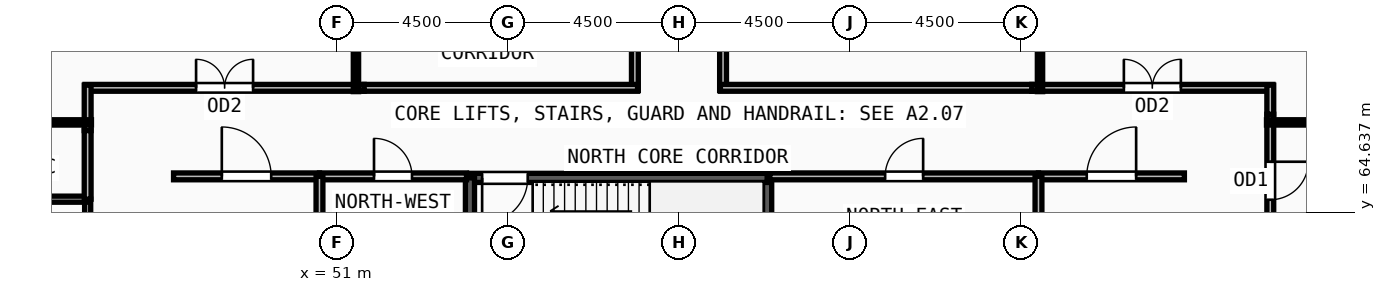
"""IFC4 building model, lengths in metres.
Left out: names, types, materials, properties, quantities, classifications, styles, units other than length and angle.
Written with IfcOpenShell. Run it as: python <this file> out.ifc"""

import sys

from ifc_helpers import new_model, si_unit, direction, frame, frame_2d, origin, place, context, subcontext, project, spatial, rectangle, extrude, source, transform, mapped, element, fill, save


model = new_model("IFC4")
c1 = context("Model", 3, precision=1e-05, world=origin(), true_north=direction((0.0, 1.0)))
c2 = subcontext(c1, "Body", "Model", "MODEL_VIEW")
j1 = project(units=[si_unit("LENGTHUNIT", "METRE"), si_unit("PLANEANGLEUNIT", "RADIAN")], contexts=[c1])
p1 = place(None, origin())
s1 = spatial("IfcSite", under=j1, at=p1, CompositionType="ELEMENT")
p2 = place(p1, origin())
s2 = spatial("IfcBuilding", under=s1, at=p2, CompositionType="ELEMENT")
p3 = place(p2, frame((0.0, 0.0, 74.25)))
s3 = spatial("IfcBuildingStorey", under=s2, at=p3, CompositionType="ELEMENT", Elevation=74.25)
p4 = place(p3, frame((62.32, 62.1, 0.0), z_axis=(0.0, 0.0, 1.0), x_axis=(0.0, 1.0, 0.0)))
e1 = element("IfcWall", 1, at=p4, inside=s3, PredefinedType="SOLIDWALL", context=c2, shape_type="SweptSolid", body=[
    extrude(rectangle(XDim=3.44, YDim=0.24, at=frame_2d((1.72, 0.0))), origin(), (0.0, 0.0, 1.0), 3.57),
])
p5 = place(p3, frame((62.32, 65.54, 0.0), z_axis=(0.0, 0.0, 1.0), x_axis=(-1.0, 0.0, 0.0)))
e2 = element("IfcWall", 2, at=p5, inside=s3, PredefinedType="SOLIDWALL", context=c2, shape_type="SweptSolid", body=[
    extrude(rectangle(XDim=7.82, YDim=0.24, at=frame_2d((3.91, 0.0))), origin(), (0.0, 0.0, 1.0), 3.57),
])
m1 = source(origin(), c2, "Body", "SweptSolid", [
    extrude(rectangle(XDim=1.2, YDim=2.2, at=frame_2d((0.6, 1.1))), frame((0.0, 0.13, 0.0), z_axis=(0.0, -1.0, 0.0), x_axis=(1.0, 0.0, 0.0)), (0.0, 0.0, 1.0), 0.26),
])
p6 = place(p5, frame((6.3, 0.0, 0.0)))
e3 = element("IfcOpeningElement", 3, at=p6, cuts=e2, PredefinedType="OPENING", context=c2, shape_type="MappedRepresentation", body=[
    mapped(m1, transform((0.0, 0.0, 0.0), x_axis=(1.0, 0.0, 0.0), y_axis=(0.0, 1.0, 0.0), z_axis=(0.0, 0.0, 1.0), scale=1.0)),
])
p7 = place(p3, frame((54.5, 65.54, 0.0), z_axis=(0.0, 0.0, 1.0), x_axis=(0.0, -1.0, 0.0)))
e4 = element("IfcWall", 4, at=p7, inside=s3, PredefinedType="SOLIDWALL", context=c2, shape_type="SweptSolid", body=[
    extrude(rectangle(XDim=3.44, YDim=0.24, at=frame_2d((1.72, 0.0))), origin(), (0.0, 0.0, 1.0), 3.57),
])
p8 = place(p3, frame((44.44, 62.24, 0.0), z_axis=(0.0, 0.0, 1.0), x_axis=(0.0, 1.0, 0.0)))
e5 = element("IfcWall", 5, at=p8, inside=s3, PredefinedType="PARTITIONING", context=c2, shape_type="SweptSolid", body=[
    extrude(rectangle(XDim=2.74, YDim=0.16, at=frame_2d((1.37, 0.0))), origin(), (0.0, 0.0, 1.0), 3.57),
])
m2 = source(origin(), c2, "Body", "SweptSolid", [
    extrude(rectangle(XDim=1.05, YDim=2.15, at=frame_2d((0.525, 1.075))), frame((0.0, 0.09, 0.0), z_axis=(0.0, -1.0, 0.0), x_axis=(1.0, 0.0, 0.0)), (0.0, 0.0, 1.0), 0.18),
])
p9 = place(p8, frame((0.845, 0.0, 0.0)))
e6 = element("IfcOpeningElement", 6, at=p9, cuts=e5, PredefinedType="OPENING", context=c2, shape_type="MappedRepresentation", body=[
    mapped(m2, transform((0.0, 0.0, 0.0), x_axis=(1.0, 0.0, 0.0), y_axis=(0.0, 1.0, 0.0), z_axis=(0.0, 0.0, 1.0), scale=1.0)),
])
p10 = place(p3, frame((50.54, 65.58, 0.0), z_axis=(0.0, 0.0, 1.0), x_axis=(1.0, 0.0, 0.0)))
e7 = element("IfcWall", 7, at=p10, inside=s3, PredefinedType="PARTITIONING", context=c2, shape_type="SweptSolid", body=[
    extrude(rectangle(XDim=3.87, YDim=0.18, at=frame_2d((1.935, 0.0))), origin(), (0.0, 0.0, 1.0), 3.57),
])
m3 = source(origin(), c2, "Body", "SweptSolid", [
    extrude(rectangle(XDim=1.0, YDim=2.2, at=frame_2d((0.5, 1.1))), frame((0.0, 0.1, 0.0), z_axis=(0.0, -1.0, 0.0), x_axis=(1.0, 0.0, 0.0)), (0.0, 0.0, 1.0), 0.2),
])
p11 = place(p10, frame((1.435, 0.0, 0.0)))
e8 = element("IfcOpeningElement", 8, at=p11, cuts=e7, PredefinedType="OPENING", context=c2, shape_type="MappedRepresentation", body=[
    mapped(m3, transform((0.0, 0.0, 0.0), x_axis=(1.0, 0.0, 0.0), y_axis=(0.0, 1.0, 0.0), z_axis=(0.0, 0.0, 1.0), scale=1.0)),
])
p12 = place(p3, frame((62.39, 65.58, 0.0), z_axis=(0.0, 0.0, 1.0), x_axis=(1.0, 0.0, 0.0)))
e9 = element("IfcWall", 9, at=p12, inside=s3, PredefinedType="PARTITIONING", context=c2, shape_type="SweptSolid", body=[
    extrude(rectangle(XDim=7.07, YDim=0.18, at=frame_2d((3.535, 0.0))), origin(), (0.0, 0.0, 1.0), 3.57),
])
p13 = place(p12, frame((3.035, 0.0, 0.0)))
e10 = element("IfcOpeningElement", 10, at=p13, cuts=e9, PredefinedType="OPENING", context=c2, shape_type="MappedRepresentation", body=[
    mapped(m3, transform((0.0, 0.0, 0.0), x_axis=(1.0, 0.0, 0.0), y_axis=(0.0, 1.0, 0.0), z_axis=(0.0, 0.0, 1.0), scale=1.0)),
])
p14 = place(p3, frame((46.7, 65.58, 0.0), z_axis=(0.0, 0.0, 1.0), x_axis=(1.0, 0.0, 0.0)))
e11 = element("IfcWall", 11, at=p14, inside=s3, PredefinedType="PARTITIONING", context=c2, shape_type="SweptSolid", body=[
    extrude(rectangle(XDim=3.84, YDim=0.18, at=frame_2d((1.92, 0.0))), origin(), (0.0, 0.0, 1.0), 3.57),
])
m4 = source(origin(), c2, "Body", "SweptSolid", [
    extrude(rectangle(XDim=1.3, YDim=2.2, at=frame_2d((0.65, 1.1))), frame((0.0, 0.1, 0.0), z_axis=(0.0, -1.0, 0.0), x_axis=(1.0, 0.0, 0.0)), (0.0, 0.0, 1.0), 0.2),
])
p15 = place(p14, frame((1.27, 0.0, 0.0)))
e12 = element("IfcOpeningElement", 12, at=p15, cuts=e11, PredefinedType="OPENING", context=c2, shape_type="MappedRepresentation", body=[
    mapped(m4, transform((0.0, 0.0, 0.0), x_axis=(1.0, 0.0, 0.0), y_axis=(0.0, 1.0, 0.0), z_axis=(0.0, 0.0, 1.0), scale=1.0)),
])
p16 = place(p3, frame((69.46, 65.58, 0.0), z_axis=(0.0, 0.0, 1.0), x_axis=(1.0, 0.0, 0.0)))
e13 = element("IfcWall", 13, at=p16, inside=s3, PredefinedType="PARTITIONING", context=c2, shape_type="SweptSolid", body=[
    extrude(rectangle(XDim=3.84, YDim=0.18, at=frame_2d((1.92, 0.0))), origin(), (0.0, 0.0, 1.0), 3.57),
])
p17 = place(p16, frame((1.27, 0.0, 0.0)))
e14 = element("IfcOpeningElement", 14, at=p17, cuts=e13, PredefinedType="OPENING", context=c2, shape_type="MappedRepresentation", body=[
    mapped(m4, transform((0.0, 0.0, 0.0), x_axis=(1.0, 0.0, 0.0), y_axis=(0.0, 1.0, 0.0), z_axis=(0.0, 0.0, 1.0), scale=1.0)),
])
p18 = place(p3, frame((75.56, 67.215, 0.0), z_axis=(0.0, 0.0, 1.0), x_axis=(0.0, -1.0, 0.0)))
e15 = element("IfcWall", 15, at=p18, inside=s3, PredefinedType="PARTITIONING", context=c2, shape_type="SweptSolid", body=[
    extrude(rectangle(XDim=3.5, YDim=0.18, at=frame_2d((1.75, 0.0))), origin(), (0.0, 0.0, 1.0), 3.57),
])
p19 = place(p18, frame((1.25, 0.0, 0.0)))
e16 = element("IfcOpeningElement", 16, at=p19, cuts=e15, PredefinedType="OPENING", context=c2, shape_type="MappedRepresentation", body=[
    mapped(m3, transform((0.0, 0.0, 0.0), x_axis=(1.0, 0.0, 0.0), y_axis=(0.0, 1.0, 0.0), z_axis=(0.0, 0.0, 1.0), scale=1.0)),
])
p20 = place(p3, frame((69.285, 67.91, 0.0), z_axis=(0.0, 0.0, 1.0), x_axis=(1.0, 0.0, 0.0)))
e17 = element("IfcWall", 17, at=p20, inside=s3, PredefinedType="PARTITIONING", context=c2, shape_type="SweptSolid", body=[
    extrude(rectangle(XDim=6.345, YDim=0.18, at=frame_2d((3.172, 0.0))), origin(), (0.0, 0.0, 1.0), 3.57),
])
m5 = source(origin(), c2, "Body", "SweptSolid", [
    extrude(rectangle(XDim=1.5, YDim=2.2, at=frame_2d((0.75, 1.1))), frame((0.0, 0.1, 0.0), z_axis=(0.0, -1.0, 0.0), x_axis=(1.0, 0.0, 0.0)), (0.0, 0.0, 1.0), 0.2),
])
p21 = place(p20, frame((2.422, 0.0, 0.0)))
e18 = element("IfcOpeningElement", 18, at=p21, cuts=e17, PredefinedType="OPENING", context=c2, shape_type="MappedRepresentation", body=[
    mapped(m5, transform((0.0, 0.0, 0.0), x_axis=(1.0, 0.0, 0.0), y_axis=(0.0, 1.0, 0.0), z_axis=(0.0, 0.0, 1.0), scale=1.0)),
])
p22 = place(p3, frame((61.16, 81.729, 0.0), z_axis=(0.0, 0.0, 1.0), x_axis=(0.0, -1.0, 0.0)))
e19 = element("IfcWall", 19, at=p22, inside=s3, PredefinedType="PARTITIONING", context=c2, shape_type="SweptSolid", body=[
    extrude(rectangle(XDim=13.889, YDim=0.18, at=frame_2d((6.944, 0.0))), origin(), (0.0, 0.0, 1.0), 3.57),
])
p23 = place(p22, frame((6.444, 0.0, 0.0)))
e20 = element("IfcOpeningElement", 20, at=p23, cuts=e19, PredefinedType="OPENING", context=c2, shape_type="MappedRepresentation", body=[
    mapped(m3, transform((0.0, 0.0, 0.0), x_axis=(1.0, 0.0, 0.0), y_axis=(0.0, 1.0, 0.0), z_axis=(0.0, 0.0, 1.0), scale=1.0)),
])
p24 = place(p3, frame((58.84, 67.84, 0.0), z_axis=(0.0, 0.0, 1.0), x_axis=(0.0, 1.0, 0.0)))
e21 = element("IfcWall", 21, at=p24, inside=s3, PredefinedType="PARTITIONING", context=c2, shape_type="SweptSolid", body=[
    extrude(rectangle(XDim=14.02, YDim=0.18, at=frame_2d((7.01, 0.0))), origin(), (0.0, 0.0, 1.0), 3.57),
])
p25 = place(p24, frame((6.51, 0.0, 0.0)))
e22 = element("IfcOpeningElement", 22, at=p25, cuts=e21, PredefinedType="OPENING", context=c2, shape_type="MappedRepresentation", body=[
    mapped(m3, transform((0.0, 0.0, 0.0), x_axis=(1.0, 0.0, 0.0), y_axis=(0.0, 1.0, 0.0), z_axis=(0.0, 0.0, 1.0), scale=1.0)),
])
p26 = place(p3, frame((44.37, 67.91, 0.0), z_axis=(0.0, 0.0, 1.0), x_axis=(1.0, 0.0, 0.0)))
e23 = element("IfcWall", 23, at=p26, inside=s3, PredefinedType="PARTITIONING", context=c2, shape_type="SweptSolid", body=[
    extrude(rectangle(XDim=7.345, YDim=0.18, at=frame_2d((3.672, 0.0))), origin(), (0.0, 0.0, 1.0), 3.57),
])
p27 = place(p26, frame((2.923, 0.0, 0.0)))
e24 = element("IfcOpeningElement", 24, at=p27, cuts=e23, PredefinedType="OPENING", context=c2, shape_type="MappedRepresentation", body=[
    mapped(m5, transform((0.0, 0.0, 0.0), x_axis=(1.0, 0.0, 0.0), y_axis=(0.0, 1.0, 0.0), z_axis=(0.0, 0.0, 1.0), scale=1.0)),
])
p28 = place(p3, frame((39.98, 64.98, 0.0), z_axis=(0.0, 0.0, 1.0), x_axis=(1.0, 0.0, 0.0)))
e25 = element("IfcWall", 25, at=p28, inside=s3, PredefinedType="PARTITIONING", context=c2, shape_type="SweptSolid", body=[
    extrude(rectangle(XDim=4.46, YDim=0.16, at=frame_2d((2.23, 0.0))), origin(), (0.0, 0.0, 1.0), 3.57),
])
for number, where, z_axis, x_axis in (
    (26, (50.54, 61.95, 0.0), (0.0, 0.0, 1.0), (0.0, 1.0, 0.0)),
    (27, (69.46, 61.95, 0.0), (0.0, 0.0, 1.0), (0.0, 1.0, 0.0)),
):
    element("IfcWall", number, at=place(p3, frame(where, z_axis=z_axis, x_axis=x_axis)), inside=s3, PredefinedType="PARTITIONING", context=c2, shape_type="SweptSolid", body=[
        extrude(rectangle(XDim=3.63, YDim=0.18, at=frame_2d((1.815, 0.0))), origin(), (0.0, 0.0, 1.0), 3.57),
    ])
p29 = place(p3, frame((75.56, 67.98, 0.0), z_axis=(0.0, 0.0, 1.0), x_axis=(0.0, -1.0, 0.0)))
e28 = element("IfcWall", 28, at=p29, inside=s3, PredefinedType="PARTITIONING", context=c2, shape_type="SweptSolid", body=[
    extrude(rectangle(XDim=0.765, YDim=0.18, at=frame_2d((0.382, 0.0))), origin(), (0.0, 0.0, 1.0), 3.57),
])
p30 = place(p3, frame((61.09, 67.91, 0.0), z_axis=(0.0, 0.0, 1.0), x_axis=(1.0, 0.0, 0.0)))
e29 = element("IfcWall", 29, at=p30, inside=s3, PredefinedType="PARTITIONING", context=c2, shape_type="SweptSolid", body=[
    extrude(rectangle(XDim=8.195, YDim=0.18, at=frame_2d((4.097, 0.0))), origin(), (0.0, 0.0, 1.0), 3.57),
])
p31 = place(p3, frame((51.715, 67.91, 0.0), z_axis=(0.0, 0.0, 1.0), x_axis=(1.0, 0.0, 0.0)))
e30 = element("IfcWall", 30, at=p31, inside=s3, PredefinedType="PARTITIONING", context=c2, shape_type="SweptSolid", body=[
    extrude(rectangle(XDim=7.195, YDim=0.18, at=frame_2d((3.597, 0.0))), origin(), (0.0, 0.0, 1.0), 3.57),
])
p32 = place(p3, frame((44.44, 66.785, 0.0), z_axis=(0.0, 0.0, 1.0), x_axis=(0.0, 1.0, 0.0)))
e31 = element("IfcWall", 31, at=p32, inside=s3, PredefinedType="PARTITIONING", context=c2, shape_type="SweptSolid", body=[
    extrude(rectangle(XDim=1.195, YDim=0.18, at=frame_2d((0.598, 0.0))), origin(), (0.0, 0.0, 1.0), 3.57),
])
p33 = place(p3, frame((44.44, 64.98, 0.0), z_axis=(0.0, 0.0, 1.0), x_axis=(0.0, 1.0, 0.0)))
e32 = element("IfcWall", 32, at=p33, inside=s3, PredefinedType="PARTITIONING", context=c2, shape_type="SweptSolid", body=[
    extrude(rectangle(XDim=1.805, YDim=0.18, at=frame_2d((0.902, 0.0))), origin(), (0.0, 0.0, 1.0), 3.57),
])
p34 = place(p3, frame((44.54, 67.0, 0.0), z_axis=(0.0, 0.0, 1.0), x_axis=(-1.0, 0.0, 0.0)))
e33 = element("IfcWall", 33, at=p34, inside=s3, PredefinedType="PARTITIONING", context=c2, shape_type="SweptSolid", body=[
    extrude(rectangle(XDim=22.274, YDim=0.14, at=frame_2d((11.137, 0.0))), origin(), (0.0, 0.0, 1.0), 2.655),
])
p35 = place(p3, frame((75.46, 67.0, 0.0), z_axis=(0.0, 0.0, 1.0), x_axis=(1.0, 0.0, 0.0)))
e34 = element("IfcWall", 34, at=p35, inside=s3, PredefinedType="PARTITIONING", context=c2, shape_type="SweptSolid", body=[
    extrude(rectangle(XDim=22.301, YDim=0.14, at=frame_2d((11.15, 0.0))), origin(), (0.0, 0.0, 1.0), 2.655),
])
p36 = place(p3, frame((51.5, 67.81, 0.0), z_axis=(0.0, 0.0, 1.0), x_axis=(0.0, 1.0, 0.0)))
e35 = element("IfcWall", 35, at=p36, inside=s3, PredefinedType="PARTITIONING", context=c2, shape_type="SweptSolid", body=[
    extrude(rectangle(XDim=13.86, YDim=0.14, at=frame_2d((6.93, 0.0))), origin(), (0.0, 0.0, 1.0), 3.57),
])
p37 = place(p3, frame((69.5, 67.81, 0.0), z_axis=(0.0, 0.0, 1.0), x_axis=(0.0, 1.0, 0.0)))
e36 = element("IfcWall", 36, at=p37, inside=s3, PredefinedType="PARTITIONING", context=c2, shape_type="SweptSolid", body=[
    extrude(rectangle(XDim=13.537, YDim=0.14, at=frame_2d((6.769, 0.0))), origin(), (0.0, 0.0, 1.0), 3.57),
])
m6 = source(origin(), c2, "Body", "SweptSolid", [
    extrude(rectangle(XDim=1.2, YDim=2.2, at=frame_2d((0.6, 1.1))), frame((0.0, 0.025, 0.0), z_axis=(0.0, -1.0, 0.0), x_axis=(1.0, 0.0, 0.0)), (0.0, 0.0, 1.0), 0.05),
])
p38 = place(p6, origin())
e37 = element("IfcDoor", 37, at=p38, inside=s3, OperationType="SINGLE_SWING_RIGHT", PredefinedType="DOOR", context=c2, shape_type="MappedRepresentation", body=[
    mapped(m6, transform((0.0, 0.0, 0.0), x_axis=(1.0, 0.0, 0.0), y_axis=(0.0, 1.0, 0.0), z_axis=(0.0, 0.0, 1.0), scale=1.0)),
])
fill(e3, e37)
m7 = source(origin(), c2, "Body", "SweptSolid", [
    extrude(rectangle(XDim=1.0, YDim=2.2, at=frame_2d((0.5, 1.1))), frame((0.0, 0.025, 0.0), z_axis=(0.0, -1.0, 0.0), x_axis=(1.0, 0.0, 0.0)), (0.0, 0.0, 1.0), 0.05),
])
p39 = place(p11, origin())
e38 = element("IfcDoor", 38, at=p39, inside=s3, OperationType="SINGLE_SWING_LEFT", PredefinedType="DOOR", context=c2, shape_type="MappedRepresentation", body=[
    mapped(m7, transform((0.0, 0.0, 0.0), x_axis=(1.0, 0.0, 0.0), y_axis=(0.0, 1.0, 0.0), z_axis=(0.0, 0.0, 1.0), scale=1.0)),
])
fill(e8, e38)
p40 = place(p13, origin())
e39 = element("IfcDoor", 39, at=p40, inside=s3, OperationType="SINGLE_SWING_RIGHT", PredefinedType="DOOR", context=c2, shape_type="MappedRepresentation", body=[
    mapped(m7, transform((0.0, 0.0, 0.0), x_axis=(1.0, 0.0, 0.0), y_axis=(0.0, 1.0, 0.0), z_axis=(0.0, 0.0, 1.0), scale=1.0)),
])
fill(e10, e39)
m8 = source(origin(), c2, "Body", "SweptSolid", [
    extrude(rectangle(XDim=1.3, YDim=2.2, at=frame_2d((0.65, 1.1))), frame((0.0, 0.025, 0.0), z_axis=(0.0, -1.0, 0.0), x_axis=(1.0, 0.0, 0.0)), (0.0, 0.0, 1.0), 0.05),
])
p41 = place(p15, origin())
e40 = element("IfcDoor", 40, at=p41, inside=s3, OperationType="SINGLE_SWING_LEFT", PredefinedType="DOOR", context=c2, shape_type="MappedRepresentation", body=[
    mapped(m8, transform((0.0, 0.0, 0.0), x_axis=(1.0, 0.0, 0.0), y_axis=(0.0, 1.0, 0.0), z_axis=(0.0, 0.0, 1.0), scale=1.0)),
])
fill(e12, e40)
p42 = place(p17, origin())
e41 = element("IfcDoor", 41, at=p42, inside=s3, OperationType="SINGLE_SWING_RIGHT", PredefinedType="DOOR", context=c2, shape_type="MappedRepresentation", body=[
    mapped(m8, transform((0.0, 0.0, 0.0), x_axis=(1.0, 0.0, 0.0), y_axis=(0.0, 1.0, 0.0), z_axis=(0.0, 0.0, 1.0), scale=1.0)),
])
fill(e14, e41)
p43 = place(p19, origin())
e42 = element("IfcDoor", 42, at=p43, inside=s3, OperationType="SINGLE_SWING_LEFT", PredefinedType="DOOR", context=c2, shape_type="MappedRepresentation", body=[
    mapped(m7, transform((0.0, 0.0, 0.0), x_axis=(1.0, 0.0, 0.0), y_axis=(0.0, 1.0, 0.0), z_axis=(0.0, 0.0, 1.0), scale=1.0)),
])
fill(e16, e42)
m9 = source(origin(), c2, "Body", "SweptSolid", [
    extrude(rectangle(XDim=1.5, YDim=2.2, at=frame_2d((0.75, 1.1))), frame((0.0, 0.025, 0.0), z_axis=(0.0, -1.0, 0.0), x_axis=(1.0, 0.0, 0.0)), (0.0, 0.0, 1.0), 0.05),
])
p44 = place(p21, origin())
e43 = element("IfcDoor", 43, at=p44, inside=s3, OperationType="DOUBLE_DOOR_SINGLE_SWING", PredefinedType="DOOR", context=c2, shape_type="MappedRepresentation", body=[
    mapped(m9, transform((0.0, 0.0, 0.0), x_axis=(1.0, 0.0, 0.0), y_axis=(0.0, 1.0, 0.0), z_axis=(0.0, 0.0, 1.0), scale=1.0)),
])
fill(e18, e43)
p45 = place(p27, origin())
e44 = element("IfcDoor", 44, at=p45, inside=s3, OperationType="DOUBLE_DOOR_SINGLE_SWING", PredefinedType="DOOR", context=c2, shape_type="MappedRepresentation", body=[
    mapped(m9, transform((0.0, 0.0, 0.0), x_axis=(1.0, 0.0, 0.0), y_axis=(0.0, 1.0, 0.0), z_axis=(0.0, 0.0, 1.0), scale=1.0)),
])
fill(e24, e44)
save(model, sys.argv[1])
